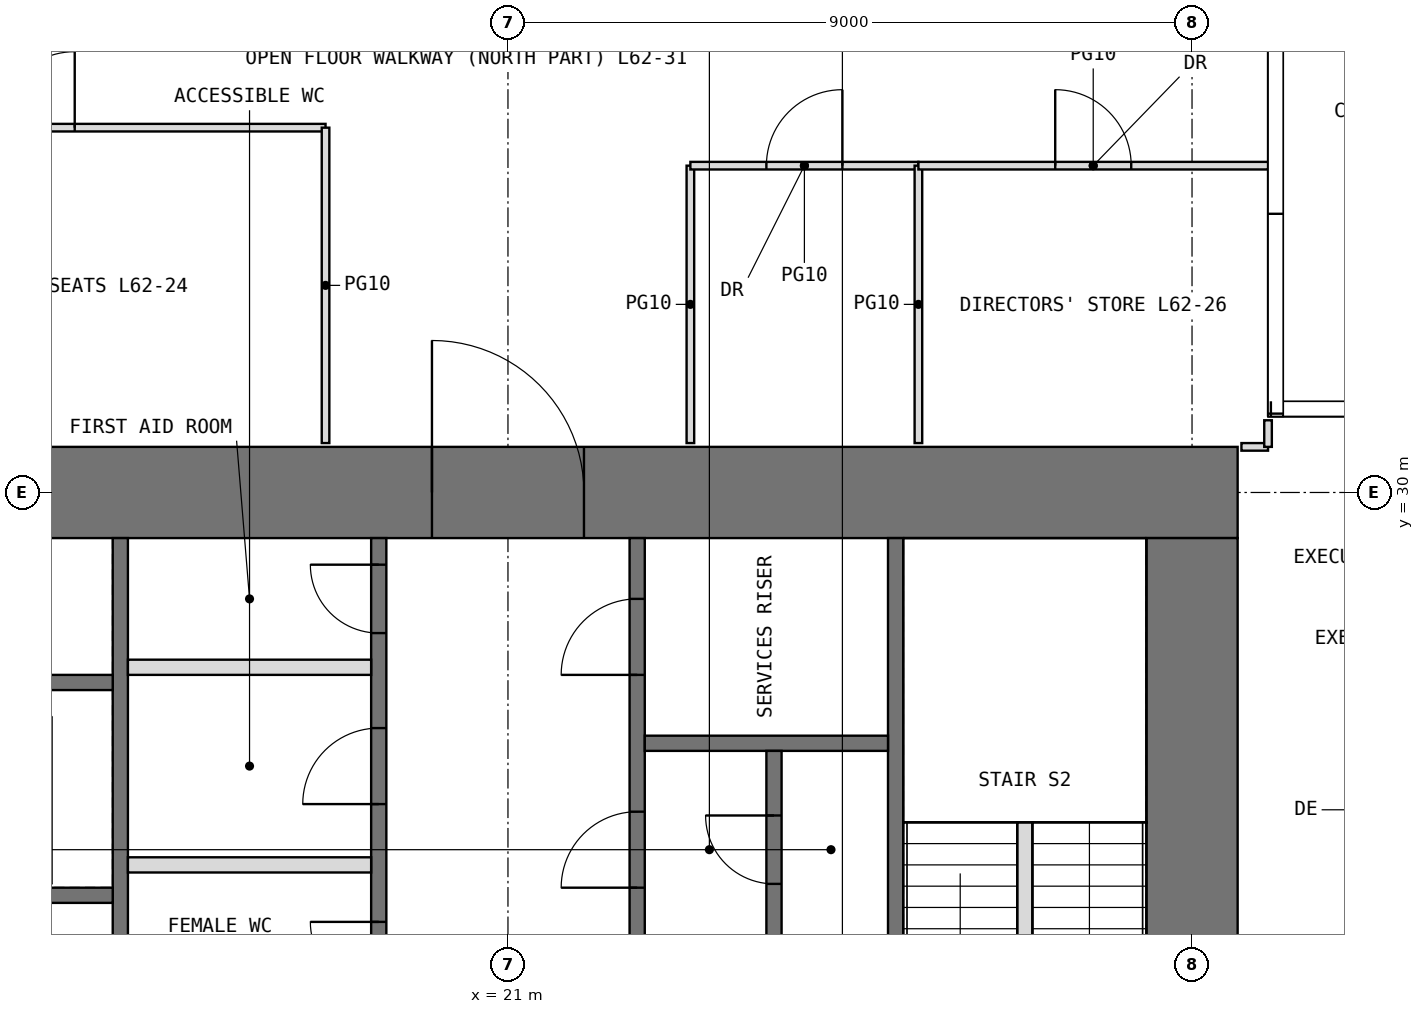
"""IFC4 building model, lengths in metres.
Left out: names, types, materials, properties, quantities, classifications, styles, units other than length and angle.
Written with IfcOpenShell. Run it as: python <this file> out.ifc"""

import sys

from ifc_helpers import new_model, si_unit, direction, frame, frame_2d, origin, place, context, subcontext, project, spatial, rectangle, extrude, element, fill, save


model = new_model("IFC4")
c1 = context("Model", 3, precision=1e-05, world=origin(), true_north=direction((0.0, 1.0)))
c2 = subcontext(c1, "Body", "Model", "MODEL_VIEW")
j1 = project(units=[si_unit("LENGTHUNIT", "METRE"), si_unit("PLANEANGLEUNIT", "RADIAN")], contexts=[c1])
p1 = place(None, origin())
s1 = spatial("IfcSite", under=j1, at=p1, CompositionType="ELEMENT")
p2 = place(p1, origin())
s2 = spatial("IfcBuilding", under=s1, at=p2, CompositionType="ELEMENT")
p3 = place(p2, frame((0.0, 0.0, 260.8)))
s3 = spatial("IfcBuildingStorey", under=s2, at=p3, CompositionType="ELEMENT", Elevation=260.8)
p4 = place(p3, frame((11.4, 30.0, -0.05), z_axis=(0.0, 0.0, 1.0), x_axis=(1.0, 0.0, 0.0)))
e1 = element("IfcWall", 1, at=p4, inside=s3, PredefinedType="SHEAR", context=c2, shape_type="SweptSolid", body=[
    extrude(rectangle(XDim=19.2, YDim=1.2, at=frame_2d((9.6, 0.0))), origin(), (0.0, 0.0, 1.0), 4.2),
])
p5 = place(p4, frame((8.6, 0.0, 0.05)))
e2 = element("IfcOpeningElement", 2, at=p5, cuts=e1, PredefinedType="OPENING", context=c2, shape_type="SweptSolid", body=[
    extrude(rectangle(XDim=2.0, YDim=2.2, at=frame_2d((1.0, 1.1))), frame((0.0, 0.61, 0.0), z_axis=(0.0, -1.0, 0.0), x_axis=(1.0, 0.0, 0.0)), (0.0, 0.0, 1.0), 1.22),
])
p6 = place(p3, frame((30.0, 12.6, -0.05), z_axis=(0.0, 0.0, 1.0), x_axis=(0.0, 1.0, 0.0)))
e3 = element("IfcWall", 3, at=p6, inside=s3, PredefinedType="SHEAR", context=c2, shape_type="SweptSolid", body=[
    extrude(rectangle(XDim=16.8, YDim=1.2, at=frame_2d((8.4, 0.0))), origin(), (0.0, 0.0, 1.0), 4.2),
])
p7 = place(p6, frame((5.9, 0.0, 0.05)))
e4 = element("IfcOpeningElement", 4, at=p7, cuts=e3, PredefinedType="OPENING", context=c2, shape_type="SweptSolid", body=[
    extrude(rectangle(XDim=1.0, YDim=2.2, at=frame_2d((0.5, 1.1))), frame((0.0, 0.61, 0.0), z_axis=(0.0, -1.0, 0.0), x_axis=(1.0, 0.0, 0.0)), (0.0, 0.0, 1.0), 1.22),
])
p8 = place(p3, frame((15.9, 12.6, -0.05), z_axis=(0.0, 0.0, 1.0), x_axis=(0.0, 1.0, 0.0)))
e5 = element("IfcWall", 5, at=p8, inside=s3, PredefinedType="SHEAR", context=c2, shape_type="SweptSolid", body=[
    extrude(rectangle(XDim=16.8, YDim=0.2, at=frame_2d((8.4, 0.0))), origin(), (0.0, 0.0, 1.0), 4.2),
])
p9 = place(p8, frame((8.9, 0.0, 0.05)))
e6 = element("IfcOpeningElement", 6, at=p9, cuts=e5, PredefinedType="OPENING", context=c2, shape_type="SweptSolid", body=[
    extrude(rectangle(XDim=1.0, YDim=2.2, at=frame_2d((0.5, 1.1))), frame((0.0, 0.11, 0.0), z_axis=(0.0, -1.0, 0.0), x_axis=(1.0, 0.0, 0.0)), (0.0, 0.0, 1.0), 0.22),
])
p10 = place(p3, frame((19.3, 12.6, -0.05), z_axis=(0.0, 0.0, 1.0), x_axis=(0.0, 1.0, 0.0)))
e7 = element("IfcWall", 7, at=p10, inside=s3, PredefinedType="SHEAR", context=c2, shape_type="SweptSolid", body=[
    extrude(rectangle(XDim=16.8, YDim=0.2, at=frame_2d((8.4, 0.0))), origin(), (0.0, 0.0, 1.0), 4.2),
])
p11 = place(p10, frame((8.7, 0.0, 0.05)))
e8 = element("IfcOpeningElement", 8, at=p11, cuts=e7, PredefinedType="OPENING", context=c2, shape_type="SweptSolid", body=[
    extrude(rectangle(XDim=1.0, YDim=2.2, at=frame_2d((0.5, 1.1))), frame((0.0, 0.11, 0.0), z_axis=(0.0, -1.0, 0.0), x_axis=(1.0, 0.0, 0.0)), (0.0, 0.0, 1.0), 0.22),
])
p12 = place(p10, frame((10.85, 0.0, 0.05)))
e9 = element("IfcOpeningElement", 9, at=p12, cuts=e7, PredefinedType="OPENING", context=c2, shape_type="SweptSolid", body=[
    extrude(rectangle(XDim=0.9, YDim=2.2, at=frame_2d((0.45, 1.1))), frame((0.0, 0.11, 0.0), z_axis=(0.0, -1.0, 0.0), x_axis=(1.0, 0.0, 0.0)), (0.0, 0.0, 1.0), 0.22),
])
p13 = place(p10, frame((13.3, 0.0, 0.05)))
e10 = element("IfcOpeningElement", 10, at=p13, cuts=e7, PredefinedType="OPENING", context=c2, shape_type="SweptSolid", body=[
    extrude(rectangle(XDim=1.0, YDim=2.2, at=frame_2d((0.5, 1.1))), frame((0.0, 0.11, 0.0), z_axis=(0.0, -1.0, 0.0), x_axis=(1.0, 0.0, 0.0)), (0.0, 0.0, 1.0), 0.22),
])
p14 = place(p10, frame((15.55, 0.0, 0.05)))
e11 = element("IfcOpeningElement", 11, at=p14, cuts=e7, PredefinedType="OPENING", context=c2, shape_type="SweptSolid", body=[
    extrude(rectangle(XDim=0.9, YDim=2.2, at=frame_2d((0.45, 1.1))), frame((0.0, 0.11, 0.0), z_axis=(0.0, -1.0, 0.0), x_axis=(1.0, 0.0, 0.0)), (0.0, 0.0, 1.0), 0.22),
])
p15 = place(p10, frame((0.75, 0.0, 0.05)))
e12 = element("IfcOpeningElement", 12, at=p15, cuts=e7, PredefinedType="OPENING", context=c2, shape_type="SweptSolid", body=[
    extrude(rectangle(XDim=1.1, YDim=2.2, at=frame_2d((0.55, 1.1))), frame((0.0, 0.11, 0.0), z_axis=(0.0, -1.0, 0.0), x_axis=(1.0, 0.0, 0.0)), (0.0, 0.0, 1.0), 0.22),
])
p16 = place(p10, frame((3.55, 0.0, 0.05)))
e13 = element("IfcOpeningElement", 13, at=p16, cuts=e7, PredefinedType="OPENING", context=c2, shape_type="SweptSolid", body=[
    extrude(rectangle(XDim=1.1, YDim=2.2, at=frame_2d((0.55, 1.1))), frame((0.0, 0.11, 0.0), z_axis=(0.0, -1.0, 0.0), x_axis=(1.0, 0.0, 0.0)), (0.0, 0.0, 1.0), 0.22),
])
p17 = place(p10, frame((6.35, 0.0, 0.05)))
e14 = element("IfcOpeningElement", 14, at=p17, cuts=e7, PredefinedType="OPENING", context=c2, shape_type="SweptSolid", body=[
    extrude(rectangle(XDim=1.1, YDim=2.2, at=frame_2d((0.55, 1.1))), frame((0.0, 0.11, 0.0), z_axis=(0.0, -1.0, 0.0), x_axis=(1.0, 0.0, 0.0)), (0.0, 0.0, 1.0), 0.22),
])
p18 = place(p3, frame((22.7, 12.6, -0.05), z_axis=(0.0, 0.0, 1.0), x_axis=(0.0, 1.0, 0.0)))
e15 = element("IfcWall", 15, at=p18, inside=s3, PredefinedType="SHEAR", context=c2, shape_type="SweptSolid", body=[
    extrude(rectangle(XDim=16.8, YDim=0.2, at=frame_2d((8.4, 0.0))), origin(), (0.0, 0.0, 1.0), 4.2),
])
p19 = place(p18, frame((0.45, 0.0, 0.05)))
e16 = element("IfcOpeningElement", 16, at=p19, cuts=e15, PredefinedType="OPENING", context=c2, shape_type="SweptSolid", body=[
    extrude(rectangle(XDim=0.9, YDim=2.2, at=frame_2d((0.45, 1.1))), frame((0.0, 0.11, 0.0), z_axis=(0.0, -1.0, 0.0), x_axis=(1.0, 0.0, 0.0)), (0.0, 0.0, 1.0), 0.22),
])
p20 = place(p18, frame((7.1, 0.0, 0.05)))
e17 = element("IfcOpeningElement", 17, at=p20, cuts=e15, PredefinedType="OPENING", context=c2, shape_type="SweptSolid", body=[
    extrude(rectangle(XDim=1.0, YDim=2.2, at=frame_2d((0.5, 1.1))), frame((0.0, 0.11, 0.0), z_axis=(0.0, -1.0, 0.0), x_axis=(1.0, 0.0, 0.0)), (0.0, 0.0, 1.0), 0.22),
])
p21 = place(p18, frame((1.95, 0.0, 0.05)))
e18 = element("IfcOpeningElement", 18, at=p21, cuts=e15, PredefinedType="OPENING", context=c2, shape_type="SweptSolid", body=[
    extrude(rectangle(XDim=0.9, YDim=2.2, at=frame_2d((0.45, 1.1))), frame((0.0, 0.11, 0.0), z_axis=(0.0, -1.0, 0.0), x_axis=(1.0, 0.0, 0.0)), (0.0, 0.0, 1.0), 0.22),
])
p22 = place(p18, frame((4.95, 0.0, 0.05)))
e19 = element("IfcOpeningElement", 19, at=p22, cuts=e15, PredefinedType="OPENING", context=c2, shape_type="SweptSolid", body=[
    extrude(rectangle(XDim=0.9, YDim=2.2, at=frame_2d((0.45, 1.1))), frame((0.0, 0.11, 0.0), z_axis=(0.0, -1.0, 0.0), x_axis=(1.0, 0.0, 0.0)), (0.0, 0.0, 1.0), 0.22),
])
p23 = place(p18, frame((9.4, 0.0, 0.05)))
e20 = element("IfcOpeningElement", 20, at=p23, cuts=e15, PredefinedType="OPENING", context=c2, shape_type="SweptSolid", body=[
    extrude(rectangle(XDim=1.0, YDim=2.2, at=frame_2d((0.5, 1.1))), frame((0.0, 0.11, 0.0), z_axis=(0.0, -1.0, 0.0), x_axis=(1.0, 0.0, 0.0)), (0.0, 0.0, 1.0), 0.22),
])
p24 = place(p18, frame((12.2, 0.0, 0.05)))
e21 = element("IfcOpeningElement", 21, at=p24, cuts=e15, PredefinedType="OPENING", context=c2, shape_type="SweptSolid", body=[
    extrude(rectangle(XDim=1.0, YDim=2.2, at=frame_2d((0.5, 1.1))), frame((0.0, 0.11, 0.0), z_axis=(0.0, -1.0, 0.0), x_axis=(1.0, 0.0, 0.0)), (0.0, 0.0, 1.0), 0.22),
])
p25 = place(p18, frame((15.0, 0.0, 0.05)))
e22 = element("IfcOpeningElement", 22, at=p25, cuts=e15, PredefinedType="OPENING", context=c2, shape_type="SweptSolid", body=[
    extrude(rectangle(XDim=1.0, YDim=2.2, at=frame_2d((0.5, 1.1))), frame((0.0, 0.11, 0.0), z_axis=(0.0, -1.0, 0.0), x_axis=(1.0, 0.0, 0.0)), (0.0, 0.0, 1.0), 0.22),
])
p26 = place(p3, frame((26.1, 12.6, -0.05), z_axis=(0.0, 0.0, 1.0), x_axis=(0.0, 1.0, 0.0)))
e23 = element("IfcWall", 23, at=p26, inside=s3, PredefinedType="SHEAR", context=c2, shape_type="SweptSolid", body=[
    extrude(rectangle(XDim=16.8, YDim=0.2, at=frame_2d((8.4, 0.0))), origin(), (0.0, 0.0, 1.0), 4.2),
])
p27 = place(p26, frame((6.9, 0.0, 0.05)))
e24 = element("IfcOpeningElement", 24, at=p27, cuts=e23, PredefinedType="OPENING", context=c2, shape_type="SweptSolid", body=[
    extrude(rectangle(XDim=1.0, YDim=2.2, at=frame_2d((0.5, 1.1))), frame((0.0, 0.11, 0.0), z_axis=(0.0, -1.0, 0.0), x_axis=(1.0, 0.0, 0.0)), (0.0, 0.0, 1.0), 0.22),
])
p28 = place(p3, frame((12.6, 24.7, -0.05), z_axis=(0.0, 0.0, 1.0), x_axis=(1.0, 0.0, 0.0)))
e25 = element("IfcWall", 25, at=p28, inside=s3, PredefinedType="SHEAR", context=c2, shape_type="SweptSolid", body=[
    extrude(rectangle(XDim=3.2, YDim=0.2, at=frame_2d((1.6, 0.0))), origin(), (0.0, 0.0, 1.0), 4.2),
])
p29 = place(p28, frame((1.0, 0.0, 0.05)))
e26 = element("IfcOpeningElement", 26, at=p29, cuts=e25, PredefinedType="OPENING", context=c2, shape_type="SweptSolid", body=[
    extrude(rectangle(XDim=1.2, YDim=2.2, at=frame_2d((0.6, 1.1))), frame((0.0, 0.11, 0.0), z_axis=(0.0, -1.0, 0.0), x_axis=(1.0, 0.0, 0.0)), (0.0, 0.0, 1.0), 0.22),
])
p30 = place(p3, frame((12.6, 27.5, -0.05), z_axis=(0.0, 0.0, 1.0), x_axis=(1.0, 0.0, 0.0)))
e27 = element("IfcWall", 27, at=p30, inside=s3, PredefinedType="SHEAR", context=c2, shape_type="SweptSolid", body=[
    extrude(rectangle(XDim=3.2, YDim=0.2, at=frame_2d((1.6, 0.0))), origin(), (0.0, 0.0, 1.0), 4.2),
])
for number, where, z_axis, x_axis in (
    (28, (16.0, 25.1, 0.0), (0.0, 0.0, 1.0), (1.0, 0.0, 0.0)),
    (29, (16.0, 27.7, 0.0), (0.0, 0.0, 1.0), (1.0, 0.0, 0.0)),
):
    element("IfcWall", number, at=place(p3, frame(where, z_axis=z_axis, x_axis=x_axis)), inside=s3, PredefinedType="PARTITIONING", context=c2, shape_type="SweptSolid", body=[
        extrude(rectangle(XDim=3.2, YDim=0.2, at=frame_2d((1.6, 0.0))), origin(), (0.0, 0.0, 1.0), 3.95),
    ])
p31 = place(p3, frame((22.8, 26.7, -0.05), z_axis=(0.0, 0.0, 1.0), x_axis=(1.0, 0.0, 0.0)))
e30 = element("IfcWall", 30, at=p31, inside=s3, PredefinedType="SHEAR", context=c2, shape_type="SweptSolid", body=[
    extrude(rectangle(XDim=3.2, YDim=0.2, at=frame_2d((1.6, 0.0))), origin(), (0.0, 0.0, 1.0), 4.2),
])
p32 = place(p3, frame((24.5, 24.0, -0.05), z_axis=(0.0, 0.0, 1.0), x_axis=(0.0, 1.0, 0.0)))
e31 = element("IfcWall", 31, at=p32, inside=s3, PredefinedType="SHEAR", context=c2, shape_type="SweptSolid", body=[
    extrude(rectangle(XDim=2.6, YDim=0.2, at=frame_2d((1.3, 0.0))), origin(), (0.0, 0.0, 1.0), 4.2),
])
p33 = place(p32, frame((0.85, 0.0, 0.05)))
e32 = element("IfcOpeningElement", 32, at=p33, cuts=e31, PredefinedType="OPENING", context=c2, shape_type="SweptSolid", body=[
    extrude(rectangle(XDim=0.9, YDim=2.2, at=frame_2d((0.45, 1.1))), frame((0.0, 0.11, 0.0), z_axis=(0.0, -1.0, 0.0), x_axis=(1.0, 0.0, 0.0)), (0.0, 0.0, 1.0), 0.22),
])
p34 = place(p3, frame((11.0, 34.8, 0.0), z_axis=(0.0, 0.0, 1.0), x_axis=(1.0, 0.0, 0.0)))
e33 = element("IfcWall", 33, at=p34, inside=s3, PredefinedType="PARTITIONING", context=c2, shape_type="SweptSolid", body=[
    extrude(rectangle(XDim=7.6, YDim=0.1, at=frame_2d((3.8, 0.0))), origin(), (0.0, 0.0, 1.0), 3.95),
])
p35 = place(p34, frame((3.3, 0.0, 0.0)))
e34 = element("IfcOpeningElement", 34, at=p35, cuts=e33, PredefinedType="OPENING", context=c2, shape_type="SweptSolid", body=[
    extrude(rectangle(XDim=1.0, YDim=2.2, at=frame_2d((0.5, 1.1))), frame((0.0, 0.06, 0.0), z_axis=(0.0, -1.0, 0.0), x_axis=(1.0, 0.0, 0.0)), (0.0, 0.0, 1.0), 0.12),
])
p36 = place(p3, frame((18.6, 30.65, 0.0), z_axis=(0.0, 0.0, 1.0), x_axis=(0.0, 1.0, 0.0)))
e35 = element("IfcWall", 35, at=p36, inside=s3, PredefinedType="PARTITIONING", context=c2, shape_type="SweptSolid", body=[
    extrude(rectangle(XDim=4.15, YDim=0.1, at=frame_2d((2.075, 0.0))), origin(), (0.0, 0.0, 1.0), 3.95),
])
p37 = place(p3, frame((23.4, 30.65, 0.0), z_axis=(0.0, 0.0, 1.0), x_axis=(0.0, 1.0, 0.0)))
e36 = element("IfcWall", 36, at=p37, inside=s3, PredefinedType="PARTITIONING", context=c2, shape_type="SweptSolid", body=[
    extrude(rectangle(XDim=3.65, YDim=0.1, at=frame_2d((1.825, 0.0))), origin(), (0.0, 0.0, 1.0), 3.95),
])
p38 = place(p3, frame((23.4, 34.3, 0.0), z_axis=(0.0, 0.0, 1.0), x_axis=(1.0, 0.0, 0.0)))
e37 = element("IfcWall", 37, at=p38, inside=s3, PredefinedType="PARTITIONING", context=c2, shape_type="SweptSolid", body=[
    extrude(rectangle(XDim=3.0, YDim=0.1, at=frame_2d((1.5, 0.0))), origin(), (0.0, 0.0, 1.0), 3.95),
])
p39 = place(p38, frame((1.0, 0.0, 0.0)))
e38 = element("IfcOpeningElement", 38, at=p39, cuts=e37, PredefinedType="OPENING", context=c2, shape_type="SweptSolid", body=[
    extrude(rectangle(XDim=1.0, YDim=2.2, at=frame_2d((0.5, 1.1))), frame((0.0, 0.06, 0.0), z_axis=(0.0, -1.0, 0.0), x_axis=(1.0, 0.0, 0.0)), (0.0, 0.0, 1.0), 0.12),
])
p40 = place(p3, frame((26.4, 30.65, 0.0), z_axis=(0.0, 0.0, 1.0), x_axis=(0.0, 1.0, 0.0)))
e39 = element("IfcWall", 39, at=p40, inside=s3, PredefinedType="PARTITIONING", context=c2, shape_type="SweptSolid", body=[
    extrude(rectangle(XDim=3.65, YDim=0.1, at=frame_2d((1.825, 0.0))), origin(), (0.0, 0.0, 1.0), 3.95),
])
p41 = place(p3, frame((26.4, 34.3, 0.0), z_axis=(0.0, 0.0, 1.0), x_axis=(1.0, 0.0, 0.0)))
e40 = element("IfcWall", 40, at=p41, inside=s3, PredefinedType="PARTITIONING", context=c2, shape_type="SweptSolid", body=[
    extrude(rectangle(XDim=4.6, YDim=0.1, at=frame_2d((2.3, 0.0))), origin(), (0.0, 0.0, 1.0), 3.95),
])
p42 = place(p41, frame((1.8, 0.0, 0.0)))
e41 = element("IfcOpeningElement", 41, at=p42, cuts=e40, PredefinedType="OPENING", context=c2, shape_type="SweptSolid", body=[
    extrude(rectangle(XDim=1.0, YDim=2.2, at=frame_2d((0.5, 1.1))), frame((0.0, 0.06, 0.0), z_axis=(0.0, -1.0, 0.0), x_axis=(1.0, 0.0, 0.0)), (0.0, 0.0, 1.0), 0.12),
])
p43 = place(p3, frame((30.65, 30.6, 0.0), z_axis=(0.0, 0.0, 1.0), x_axis=(1.0, 0.0, 0.0)))
e42 = element("IfcWall", 42, at=p43, inside=s3, PredefinedType="PARTITIONING", context=c2, shape_type="SweptSolid", body=[
    extrude(rectangle(XDim=0.35, YDim=0.1, at=frame_2d((0.175, 0.0))), origin(), (0.0, 0.0, 1.0), 3.95),
])
p44 = place(p3, frame((31.0, 30.6, 0.0), z_axis=(0.0, 0.0, 1.0), x_axis=(0.0, 1.0, 0.0)))
e43 = element("IfcWall", 43, at=p44, inside=s3, PredefinedType="PARTITIONING", context=c2, shape_type="SweptSolid", body=[
    extrude(rectangle(XDim=0.35, YDim=0.1, at=frame_2d((0.175, 0.0))), origin(), (0.0, 0.0, 1.0), 3.95),
])
p45 = place(p3, frame((27.8, 22.3, 0.0), z_axis=(0.0, 0.0, 1.0), x_axis=(0.0, 1.0, 0.0)))
e44 = element("IfcWall", 44, at=p45, inside=s3, PredefinedType="PARTITIONING", context=c2, shape_type="SweptSolid", body=[
    extrude(rectangle(XDim=3.36, YDim=0.2, at=frame_2d((1.68, 0.0))), origin(), (0.0, 0.0, 1.0), 4.2),
])
p46 = place(p5, origin())
e45 = element("IfcDoor", 45, at=p46, inside=s3, OperationType="DOUBLE_DOOR_SINGLE_SWING", PredefinedType="DOOR", context=c2, shape_type="SweptSolid", body=[
    extrude(rectangle(XDim=2.0, YDim=2.2, at=frame_2d((1.0, 1.1))), frame((0.0, 0.025, 0.0), z_axis=(0.0, -1.0, 0.0), x_axis=(1.0, 0.0, 0.0)), (0.0, 0.0, 1.0), 0.05),
])
fill(e2, e45)
p47 = place(p12, origin())
e46 = element("IfcDoor", 46, at=p47, inside=s3, OperationType="SINGLE_SWING_RIGHT", PredefinedType="DOOR", context=c2, shape_type="SweptSolid", body=[
    extrude(rectangle(XDim=0.9, YDim=2.2, at=frame_2d((0.45, 1.1))), frame((0.0, 0.025, 0.0), z_axis=(0.0, -1.0, 0.0), x_axis=(1.0, 0.0, 0.0)), (0.0, 0.0, 1.0), 0.05),
])
fill(e9, e46)
p48 = place(p13, origin())
e47 = element("IfcDoor", 47, at=p48, inside=s3, OperationType="SINGLE_SWING_LEFT", PredefinedType="DOOR", context=c2, shape_type="SweptSolid", body=[
    extrude(rectangle(XDim=1.0, YDim=2.2, at=frame_2d((0.5, 1.1))), frame((0.0, 0.025, 0.0), z_axis=(0.0, -1.0, 0.0), x_axis=(1.0, 0.0, 0.0)), (0.0, 0.0, 1.0), 0.05),
])
fill(e10, e47)
p49 = place(p14, origin())
e48 = element("IfcDoor", 48, at=p49, inside=s3, OperationType="SINGLE_SWING_RIGHT", PredefinedType="DOOR", context=c2, shape_type="SweptSolid", body=[
    extrude(rectangle(XDim=0.9, YDim=2.2, at=frame_2d((0.45, 1.1))), frame((0.0, 0.025, 0.0), z_axis=(0.0, -1.0, 0.0), x_axis=(1.0, 0.0, 0.0)), (0.0, 0.0, 1.0), 0.05),
])
fill(e11, e48)
p50 = place(p24, origin())
e49 = element("IfcDoor", 49, at=p50, inside=s3, OperationType="SINGLE_SWING_LEFT", PredefinedType="DOOR", context=c2, shape_type="SweptSolid", body=[
    extrude(rectangle(XDim=1.0, YDim=2.2, at=frame_2d((0.5, 1.1))), frame((0.0, 0.025, 0.0), z_axis=(0.0, -1.0, 0.0), x_axis=(1.0, 0.0, 0.0)), (0.0, 0.0, 1.0), 0.05),
])
fill(e21, e49)
p51 = place(p33, origin())
e50 = element("IfcDoor", 50, at=p51, inside=s3, OperationType="SINGLE_SWING_RIGHT", PredefinedType="DOOR", context=c2, shape_type="SweptSolid", body=[
    extrude(rectangle(XDim=0.9, YDim=2.2, at=frame_2d((0.45, 1.1))), frame((0.0, 0.025, 0.0), z_axis=(0.0, -1.0, 0.0), x_axis=(1.0, 0.0, 0.0)), (0.0, 0.0, 1.0), 0.05),
])
fill(e32, e50)
p52 = place(p25, origin())
e51 = element("IfcDoor", 51, at=p52, inside=s3, OperationType="SINGLE_SWING_LEFT", PredefinedType="DOOR", context=c2, shape_type="SweptSolid", body=[
    extrude(rectangle(XDim=1.0, YDim=2.2, at=frame_2d((0.5, 1.1))), frame((0.0, 0.025, 0.0), z_axis=(0.0, -1.0, 0.0), x_axis=(1.0, 0.0, 0.0)), (0.0, 0.0, 1.0), 0.05),
])
fill(e22, e51)
p53 = place(p35, origin())
e52 = element("IfcDoor", 52, at=p53, inside=s3, OperationType="SINGLE_SWING_RIGHT", PredefinedType="DOOR", context=c2, shape_type="SweptSolid", body=[
    extrude(rectangle(XDim=1.0, YDim=2.2, at=frame_2d((0.5, 1.1))), frame((0.0, 0.025, 0.0), z_axis=(0.0, -1.0, 0.0), x_axis=(1.0, 0.0, 0.0)), (0.0, 0.0, 1.0), 0.05),
])
fill(e34, e52)
p54 = place(p39, origin())
e53 = element("IfcDoor", 53, at=p54, inside=s3, OperationType="SINGLE_SWING_RIGHT", PredefinedType="DOOR", context=c2, shape_type="SweptSolid", body=[
    extrude(rectangle(XDim=1.0, YDim=2.2, at=frame_2d((0.5, 1.1))), frame((0.0, 0.025, 0.0), z_axis=(0.0, -1.0, 0.0), x_axis=(1.0, 0.0, 0.0)), (0.0, 0.0, 1.0), 0.05),
])
fill(e38, e53)
p55 = place(p42, origin())
e54 = element("IfcDoor", 54, at=p55, inside=s3, OperationType="SINGLE_SWING_LEFT", PredefinedType="DOOR", context=c2, shape_type="SweptSolid", body=[
    extrude(rectangle(XDim=1.0, YDim=2.2, at=frame_2d((0.5, 1.1))), frame((0.0, 0.025, 0.0), z_axis=(0.0, -1.0, 0.0), x_axis=(1.0, 0.0, 0.0)), (0.0, 0.0, 1.0), 0.05),
])
fill(e41, e54)
save(model, sys.argv[1])
